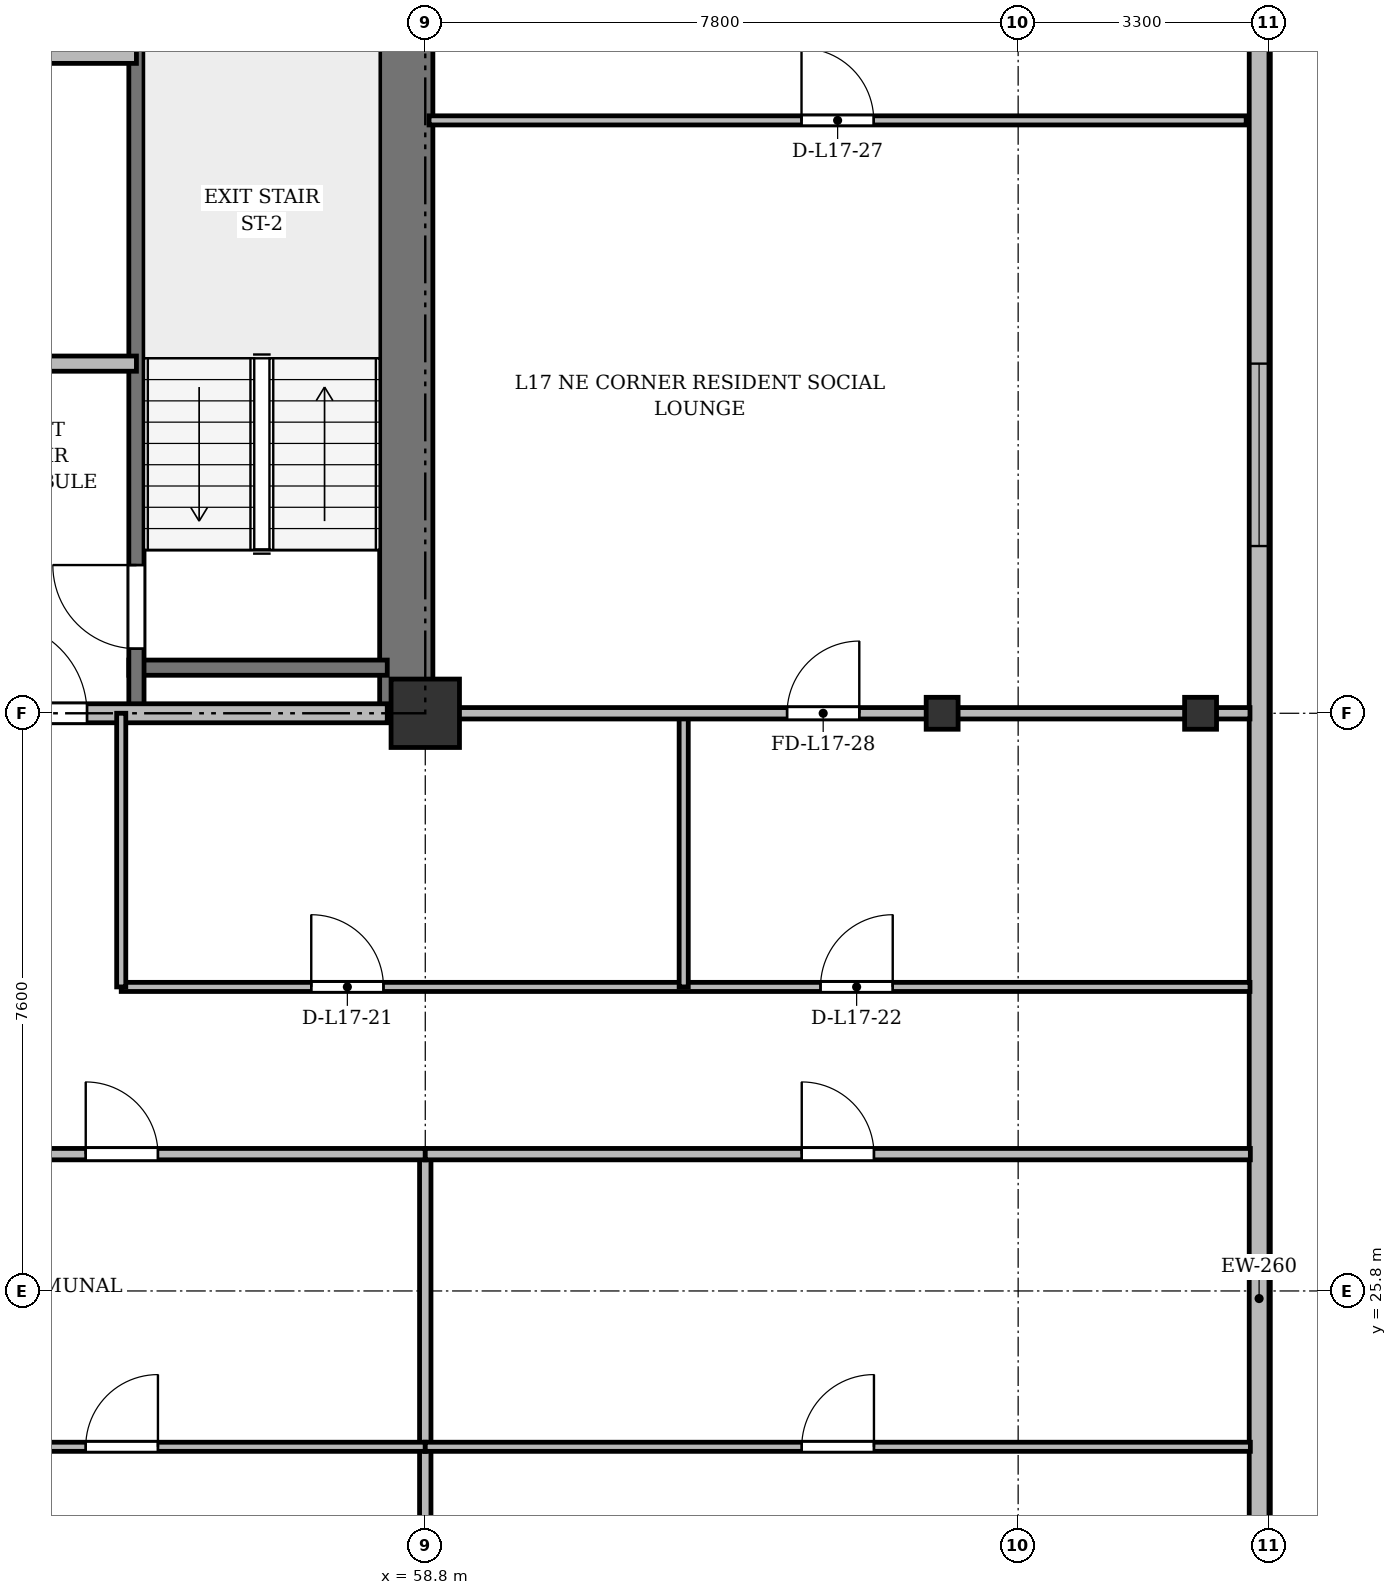
"""IFC4 building model, lengths in metres.
Left out: names, types, materials, properties, quantities, classifications, styles, units other than length and angle.
Written with IfcOpenShell. Run it as: python <this file> out.ifc"""

import sys

from ifc_helpers import new_model, si_unit, direction, frame, frame_2d, origin, origin_2d, place, context, subcontext, project, spatial, rectangle, i_section, extrude, source, transform, mapped, element, fill, save


model = new_model("IFC4")
c1 = context("Model", 3, precision=1e-05, world=origin(), true_north=direction((0.0, 1.0)))
c2 = subcontext(c1, "Body", "Model", "MODEL_VIEW")
j1 = project(units=[si_unit("LENGTHUNIT", "METRE"), si_unit("PLANEANGLEUNIT", "RADIAN")], contexts=[c1])
p1 = place(None, origin())
s1 = spatial("IfcSite", under=j1, at=p1, CompositionType="ELEMENT")
p2 = place(p1, origin())
s2 = spatial("IfcBuilding", under=s1, at=p2, CompositionType="ELEMENT")
p3 = place(p2, frame((0.0, 0.0, 66.7)))
s3 = spatial("IfcBuildingStorey", under=s2, at=p3, CompositionType="ELEMENT", Elevation=66.7)
m1 = source(origin(), c2, "Body", "SweptSolid", [
    extrude(rectangle(XDim=0.9, YDim=0.9, at=origin_2d()), origin(), (0.0, 0.0, 1.0), 3.6),
])
p4 = place(p3, frame((58.8, 33.4, 0.0), z_axis=(0.0, 0.0, 1.0), x_axis=(1.0, 0.0, 0.0)))
e1 = element("IfcColumn", 1, at=p4, inside=s3, PredefinedType="COLUMN", context=c2, shape_type="MappedRepresentation", body=[
    mapped(m1, transform((0.0, 0.0, 0.0), x_axis=(1.0, 0.0, 0.0), y_axis=(0.0, 1.0, 0.0), z_axis=(0.0, 0.0, 1.0), scale=1.0)),
])
m2 = source(origin(), c2, "Body", "SweptSolid", [
    extrude(i_section(OverallWidth=0.42, OverallDepth=0.42, WebThickness=0.026, FlangeThickness=0.04, at=origin_2d()), origin(), (0.0, 0.0, 1.0), 3.6),
])
for number, where, z_axis, x_axis in (
    (2, (65.6, 33.4, 0.0), (0.0, 0.0, 1.0), (1.0, 0.0, 0.0)),
    (3, (69.0, 33.4, 0.0), (0.0, 0.0, 1.0), (1.0, 0.0, 0.0)),
):
    element("IfcColumn", number, at=place(p3, frame(where, z_axis=z_axis, x_axis=x_axis)), inside=s3, PredefinedType="COLUMN", context=c2, shape_type="MappedRepresentation", body=[
        mapped(m2, transform((0.0, 0.0, 0.0), x_axis=(1.0, 0.0, 0.0), y_axis=(0.0, 1.0, 0.0), z_axis=(0.0, 0.0, 1.0), scale=1.0)),
    ])
p5 = place(p3, frame((69.77, 45.5, 0.0), z_axis=(0.0, 0.0, 1.0), x_axis=(0.0, -1.0, 0.0)))
e4 = element("IfcWall", 4, at=p5, inside=s3, PredefinedType="SOLIDWALL", context=c2, shape_type="SweptSolid", body=[
    extrude(rectangle(XDim=39.6, YDim=0.26, at=frame_2d((19.8, 0.0))), origin(), (0.0, 0.0, 1.0), 3.34),
])
p6 = place(p5, frame((36.95, 0.0, 0.92)))
e5 = element("IfcOpeningElement", 5, at=p6, cuts=e4, PredefinedType="OPENING", context=c2, shape_type="SweptSolid", body=[
    extrude(rectangle(XDim=1.2, YDim=1.65, at=frame_2d((0.6, 0.825))), frame((0.0, 0.14, 0.0), z_axis=(0.0, -1.0, 0.0), x_axis=(1.0, 0.0, 0.0)), (0.0, 0.0, 1.0), 0.28),
])
p7 = place(p5, frame((32.9, 0.0, 0.92)))
e6 = element("IfcOpeningElement", 6, at=p7, cuts=e4, PredefinedType="OPENING", context=c2, shape_type="SweptSolid", body=[
    extrude(rectangle(XDim=2.4, YDim=2.1, at=frame_2d((1.2, 1.05))), frame((0.0, 0.14, 0.0), z_axis=(0.0, -1.0, 0.0), x_axis=(1.0, 0.0, 0.0)), (0.0, 0.0, 1.0), 0.28),
])
p8 = place(p5, frame((28.7, 0.0, 0.92)))
e7 = element("IfcOpeningElement", 7, at=p8, cuts=e4, PredefinedType="OPENING", context=c2, shape_type="SweptSolid", body=[
    extrude(rectangle(XDim=2.4, YDim=2.1, at=frame_2d((1.2, 1.05))), frame((0.0, 0.14, 0.0), z_axis=(0.0, -1.0, 0.0), x_axis=(1.0, 0.0, 0.0)), (0.0, 0.0, 1.0), 0.28),
])
p9 = place(p5, frame((7.5, 0.0, 0.92)))
e8 = element("IfcOpeningElement", 8, at=p9, cuts=e4, PredefinedType="OPENING", context=c2, shape_type="SweptSolid", body=[
    extrude(rectangle(XDim=2.4, YDim=2.1, at=frame_2d((1.2, 1.05))), frame((0.0, 0.14, 0.0), z_axis=(0.0, -1.0, 0.0), x_axis=(1.0, 0.0, 0.0)), (0.0, 0.0, 1.0), 0.28),
])
p10 = place(p5, frame((1.15, 0.0, 0.92)))
e9 = element("IfcOpeningElement", 9, at=p10, cuts=e4, PredefinedType="OPENING", context=c2, shape_type="SweptSolid", body=[
    extrude(rectangle(XDim=1.2, YDim=1.65, at=frame_2d((0.6, 0.825))), frame((0.0, 0.14, 0.0), z_axis=(0.0, -1.0, 0.0), x_axis=(1.0, 0.0, 0.0)), (0.0, 0.0, 1.0), 0.28),
])
p11 = place(p3, frame((58.55, 33.4, 0.0), z_axis=(0.0, 0.0, 1.0), x_axis=(0.0, 1.0, 0.0)))
e10 = element("IfcWall", 10, at=p11, inside=s3, PredefinedType="SHEAR", context=c2, shape_type="SweptSolid", body=[
    extrude(rectangle(XDim=11.7, YDim=0.7, at=frame_2d((5.85, 0.0))), origin(), (0.0, 0.0, 1.0), 3.34),
])
p12 = place(p3, frame((54.9, 34.0, 0.0), z_axis=(0.0, 0.0, 1.0), x_axis=(1.0, 0.0, 0.0)))
e11 = element("IfcWall", 11, at=p12, inside=s3, PredefinedType="SHEAR", context=c2, shape_type="SweptSolid", body=[
    extrude(rectangle(XDim=3.4, YDim=0.2, at=frame_2d((1.7, 0.0))), origin(), (0.0, 0.0, 1.0), 3.34),
])
p13 = place(p3, frame((55.0, 33.4, 0.0), z_axis=(0.0, 0.0, 1.0), x_axis=(0.0, 1.0, 0.0)))
e12 = element("IfcWall", 12, at=p13, inside=s3, PredefinedType="SHEAR", context=c2, shape_type="SweptSolid", body=[
    extrude(rectangle(XDim=11.1, YDim=0.2, at=frame_2d((5.55, 0.0))), origin(), (0.0, 0.0, 1.0), 3.34),
])
p14 = place(p13, frame((0.85, 0.0, 0.0)))
e13 = element("IfcOpeningElement", 13, at=p14, cuts=e12, PredefinedType="OPENING", context=c2, shape_type="SweptSolid", body=[
    extrude(rectangle(XDim=1.1, YDim=2.15, at=frame_2d((0.55, 1.075))), frame((0.0, 0.11, 0.0), z_axis=(0.0, -1.0, 0.0), x_axis=(1.0, 0.0, 0.0)), (0.0, 0.0, 1.0), 0.22),
])
p15 = place(p3, frame((47.15, 42.05, 0.0), z_axis=(0.0, 0.0, 1.0), x_axis=(1.0, 0.0, 0.0)))
e14 = element("IfcWall", 14, at=p15, inside=s3, PredefinedType="SOLIDWALL", context=c2, shape_type="SweptSolid", body=[
    extrude(rectangle(XDim=7.85, YDim=0.2, at=frame_2d((3.925, 0.0))), origin(), (0.0, 0.0, 1.0), 2.752),
])
p16 = place(p15, frame((0.75, 0.0, 0.0)))
e15 = element("IfcOpeningElement", 15, at=p16, cuts=e14, PredefinedType="OPENING", context=c2, shape_type="SweptSolid", body=[
    extrude(rectangle(XDim=0.9, YDim=2.1, at=frame_2d((0.45, 1.05))), frame((0.0, 0.11, 0.0), z_axis=(0.0, -1.0, 0.0), x_axis=(1.0, 0.0, 0.0)), (0.0, 0.0, 1.0), 0.22),
])
p17 = place(p15, frame((3.85, 0.0, 0.0)))
e16 = element("IfcOpeningElement", 16, at=p17, cuts=e14, PredefinedType="OPENING", context=c2, shape_type="SweptSolid", body=[
    extrude(rectangle(XDim=0.9, YDim=2.1, at=frame_2d((0.45, 1.05))), frame((0.0, 0.11, 0.0), z_axis=(0.0, -1.0, 0.0), x_axis=(1.0, 0.0, 0.0)), (0.0, 0.0, 1.0), 0.22),
])
p18 = place(p3, frame((52.45, 38.0, 0.0), z_axis=(0.0, 0.0, 1.0), x_axis=(1.0, 0.0, 0.0)))
e17 = element("IfcWall", 17, at=p18, inside=s3, PredefinedType="PARTITIONING", context=c2, shape_type="SweptSolid", body=[
    extrude(rectangle(XDim=2.55, YDim=0.2, at=frame_2d((1.275, 0.0))), origin(), (0.0, 0.0, 1.0), 3.34),
])
p19 = place(p3, frame((47.15, 33.4, 0.0), z_axis=(0.0, 0.0, 1.0), x_axis=(1.0, 0.0, 0.0)))
e18 = element("IfcWall", 18, at=p19, inside=s3, PredefinedType="PARTITIONING", context=c2, shape_type="SweptSolid", body=[
    extrude(rectangle(XDim=11.15, YDim=0.25, at=frame_2d((5.575, 0.0))), origin(), (0.0, 0.0, 1.0), 2.69),
])
p20 = place(p19, frame((0.7, 0.0, 0.0)))
e19 = element("IfcOpeningElement", 19, at=p20, cuts=e18, PredefinedType="OPENING", context=c2, shape_type="SweptSolid", body=[
    extrude(rectangle(XDim=0.95, YDim=2.15, at=frame_2d((0.475, 1.075))), frame((0.0, 0.135, 0.0), z_axis=(0.0, -1.0, 0.0), x_axis=(1.0, 0.0, 0.0)), (0.0, 0.0, 1.0), 0.27),
])
p21 = place(p19, frame((6.0, 0.0, 0.0)))
e20 = element("IfcOpeningElement", 20, at=p21, cuts=e18, PredefinedType="OPENING", context=c2, shape_type="SweptSolid", body=[
    extrude(rectangle(XDim=1.2, YDim=2.15, at=frame_2d((0.6, 1.075))), frame((0.0, 0.135, 0.0), z_axis=(0.0, -1.0, 0.0), x_axis=(1.0, 0.0, 0.0)), (0.0, 0.0, 1.0), 0.27),
])
p22 = place(p3, frame((54.8, 29.8, 0.0), z_axis=(0.0, 0.0, 1.0), x_axis=(1.0, 0.0, 0.0)))
e21 = element("IfcWall", 21, at=p22, inside=s3, PredefinedType="PARTITIONING", context=c2, shape_type="SweptSolid", body=[
    extrude(rectangle(XDim=14.85, YDim=0.12, at=frame_2d((7.425, 0.0))), origin(), (0.0, 0.0, 1.0), 2.752),
])
p23 = place(p22, frame((2.5, 0.0, 0.0)))
e22 = element("IfcOpeningElement", 22, at=p23, cuts=e21, PredefinedType="OPENING", context=c2, shape_type="SweptSolid", body=[
    extrude(rectangle(XDim=0.95, YDim=2.15, at=frame_2d((0.475, 1.075))), frame((0.0, 0.07, 0.0), z_axis=(0.0, -1.0, 0.0), x_axis=(1.0, 0.0, 0.0)), (0.0, 0.0, 1.0), 0.14),
])
p24 = place(p22, frame((9.2, 0.0, 0.0)))
e23 = element("IfcOpeningElement", 23, at=p24, cuts=e21, PredefinedType="OPENING", context=c2, shape_type="SweptSolid", body=[
    extrude(rectangle(XDim=0.95, YDim=2.15, at=frame_2d((0.475, 1.075))), frame((0.0, 0.07, 0.0), z_axis=(0.0, -1.0, 0.0), x_axis=(1.0, 0.0, 0.0)), (0.0, 0.0, 1.0), 0.14),
])
for number, where, z_axis, x_axis in (
    (24, (62.2, 29.8, 0.0), (0.0, 0.0, 1.0), (0.0, 1.0, 0.0)),
    (25, (54.8, 29.8, 0.0), (0.0, 0.0, 1.0), (0.0, 1.0, 0.0)),
):
    element("IfcWall", number, at=place(p3, frame(where, z_axis=z_axis, x_axis=x_axis)), inside=s3, PredefinedType="PARTITIONING", context=c2, shape_type="SweptSolid", body=[
        extrude(rectangle(XDim=3.6, YDim=0.12, at=frame_2d((1.8, 0.0))), origin(), (0.0, 0.0, 1.0), 2.69),
    ])
p25 = place(p3, frame((58.85, 41.2, 0.0), z_axis=(0.0, 0.0, 1.0), x_axis=(1.0, 0.0, 0.0)))
e26 = element("IfcWall", 26, at=p25, inside=s3, PredefinedType="PARTITIONING", context=c2, shape_type="SweptSolid", body=[
    extrude(rectangle(XDim=10.75, YDim=0.12, at=frame_2d((5.375, 0.0))), origin(), (0.0, 0.0, 1.0), 2.752),
])
p26 = place(p25, frame((4.9, 0.0, 0.0)))
e27 = element("IfcOpeningElement", 27, at=p26, cuts=e26, PredefinedType="OPENING", context=c2, shape_type="SweptSolid", body=[
    extrude(rectangle(XDim=0.95, YDim=2.15, at=frame_2d((0.475, 1.075))), frame((0.0, 0.07, 0.0), z_axis=(0.0, -1.0, 0.0), x_axis=(1.0, 0.0, 0.0)), (0.0, 0.0, 1.0), 0.14),
])
p27 = place(p3, frame((58.8, 33.4, 0.0), z_axis=(0.0, 0.0, 1.0), x_axis=(1.0, 0.0, 0.0)))
e28 = element("IfcWall", 28, at=p27, inside=s3, PredefinedType="PARTITIONING", context=c2, shape_type="SweptSolid", body=[
    extrude(rectangle(XDim=10.85, YDim=0.15, at=frame_2d((5.425, 0.0))), origin(), (0.0, 0.0, 1.0), 2.69),
])
p28 = place(p27, frame((4.76, 0.0, 0.0)))
e29 = element("IfcOpeningElement", 29, at=p28, cuts=e28, PredefinedType="OPENING", context=c2, shape_type="SweptSolid", body=[
    extrude(rectangle(XDim=0.95, YDim=2.15, at=frame_2d((0.475, 1.075))), frame((0.0, 0.085, 0.0), z_axis=(0.0, -1.0, 0.0), x_axis=(1.0, 0.0, 0.0)), (0.0, 0.0, 1.0), 0.17),
])
p29 = place(p3, frame((58.8, 3.145, 0.0), z_axis=(0.0, 0.0, 1.0), x_axis=(0.0, 1.0, 0.0)))
e30 = element("IfcWall", 30, at=p29, inside=s3, PredefinedType="PARTITIONING", context=c2, shape_type="SweptSolid", body=[
    extrude(rectangle(XDim=24.455, YDim=0.15, at=frame_2d((12.228, 0.0))), origin(), (0.0, 0.0, 1.0), 2.752),
])
p30 = place(p3, frame((51.0, 27.6, 0.0), z_axis=(0.0, 0.0, 1.0), x_axis=(1.0, 0.0, 0.0)))
e31 = element("IfcWall", 31, at=p30, inside=s3, PredefinedType="PARTITIONING", context=c2, shape_type="SweptSolid", body=[
    extrude(rectangle(XDim=7.8, YDim=0.15, at=frame_2d((3.9, 0.0))), origin(), (0.0, 0.0, 1.0), 2.752),
])
p31 = place(p30, frame((3.333, 0.0, 0.0)))
e32 = element("IfcOpeningElement", 32, at=p31, cuts=e31, PredefinedType="OPENING", context=c2, shape_type="SweptSolid", body=[
    extrude(rectangle(XDim=0.95, YDim=2.15, at=frame_2d((0.475, 1.075))), frame((0.0, 0.085, 0.0), z_axis=(0.0, -1.0, 0.0), x_axis=(1.0, 0.0, 0.0)), (0.0, 0.0, 1.0), 0.17),
])
p32 = place(p3, frame((51.0, 23.75, 0.0), z_axis=(0.0, 0.0, 1.0), x_axis=(1.0, 0.0, 0.0)))
e33 = element("IfcWall", 33, at=p32, inside=s3, PredefinedType="PARTITIONING", context=c2, shape_type="SweptSolid", body=[
    extrude(rectangle(XDim=7.8, YDim=0.12, at=frame_2d((3.9, 0.0))), origin(), (0.0, 0.0, 1.0), 2.752),
])
p33 = place(p32, frame((3.333, 0.0, 0.0)))
e34 = element("IfcOpeningElement", 34, at=p33, cuts=e33, PredefinedType="OPENING", context=c2, shape_type="SweptSolid", body=[
    extrude(rectangle(XDim=0.95, YDim=2.15, at=frame_2d((0.475, 1.075))), frame((0.0, 0.07, 0.0), z_axis=(0.0, -1.0, 0.0), x_axis=(1.0, 0.0, 0.0)), (0.0, 0.0, 1.0), 0.14),
])
p34 = place(p3, frame((58.8, 27.6, 0.0), z_axis=(0.0, 0.0, 1.0), x_axis=(1.0, 0.0, 0.0)))
e35 = element("IfcWall", 35, at=p34, inside=s3, PredefinedType="PARTITIONING", context=c2, shape_type="SweptSolid", body=[
    extrude(rectangle(XDim=10.855, YDim=0.15, at=frame_2d((5.427, 0.0))), origin(), (0.0, 0.0, 1.0), 2.752),
])
p35 = place(p34, frame((4.953, 0.0, 0.0)))
e36 = element("IfcOpeningElement", 36, at=p35, cuts=e35, PredefinedType="OPENING", context=c2, shape_type="SweptSolid", body=[
    extrude(rectangle(XDim=0.95, YDim=2.15, at=frame_2d((0.475, 1.075))), frame((0.0, 0.085, 0.0), z_axis=(0.0, -1.0, 0.0), x_axis=(1.0, 0.0, 0.0)), (0.0, 0.0, 1.0), 0.17),
])
p36 = place(p3, frame((58.8, 23.75, 0.0), z_axis=(0.0, 0.0, 1.0), x_axis=(1.0, 0.0, 0.0)))
e37 = element("IfcWall", 37, at=p36, inside=s3, PredefinedType="PARTITIONING", context=c2, shape_type="SweptSolid", body=[
    extrude(rectangle(XDim=10.855, YDim=0.12, at=frame_2d((5.427, 0.0))), origin(), (0.0, 0.0, 1.0), 2.752),
])
p37 = place(p36, frame((4.953, 0.0, 0.0)))
e38 = element("IfcOpeningElement", 38, at=p37, cuts=e37, PredefinedType="OPENING", context=c2, shape_type="SweptSolid", body=[
    extrude(rectangle(XDim=0.95, YDim=2.15, at=frame_2d((0.475, 1.075))), frame((0.0, 0.07, 0.0), z_axis=(0.0, -1.0, 0.0), x_axis=(1.0, 0.0, 0.0)), (0.0, 0.0, 1.0), 0.14),
])
m3 = source(origin(), c2, "Body", "SweptSolid", [
    extrude(rectangle(XDim=2.4, YDim=2.1, at=frame_2d((1.2, 1.05))), frame((0.0, 0.03, 0.0), z_axis=(0.0, -1.0, 0.0), x_axis=(1.0, 0.0, 0.0)), (0.0, 0.0, 1.0), 0.06),
])
p38 = place(p9, origin())
e39 = element("IfcWindow", 39, at=p38, inside=s3, PartitioningType="SINGLE_PANEL", PredefinedType="WINDOW", context=c2, shape_type="MappedRepresentation", body=[
    mapped(m3, transform((0.0, 0.0, 0.0), x_axis=(1.0, 0.0, 0.0), y_axis=(0.0, 1.0, 0.0), z_axis=(0.0, 0.0, 1.0), scale=1.0)),
])
fill(e8, e39)
m4 = source(origin(), c2, "Body", "SweptSolid", [
    extrude(rectangle(XDim=1.1, YDim=2.15, at=frame_2d((0.55, 1.075))), frame((0.0, 0.025, 0.0), z_axis=(0.0, -1.0, 0.0), x_axis=(1.0, 0.0, 0.0)), (0.0, 0.0, 1.0), 0.05),
])
p39 = place(p14, origin())
e40 = element("IfcDoor", 40, at=p39, inside=s3, OperationType="SINGLE_SWING_RIGHT", PredefinedType="DOOR", context=c2, shape_type="MappedRepresentation", body=[
    mapped(m4, transform((0.0, 0.0, 0.0), x_axis=(1.0, 0.0, 0.0), y_axis=(0.0, 1.0, 0.0), z_axis=(0.0, 0.0, 1.0), scale=1.0)),
])
fill(e13, e40)
m5 = source(origin(), c2, "Body", "SweptSolid", [
    extrude(rectangle(XDim=1.2, YDim=2.15, at=frame_2d((0.6, 1.075))), frame((0.0, 0.025, 0.0), z_axis=(0.0, -1.0, 0.0), x_axis=(1.0, 0.0, 0.0)), (0.0, 0.0, 1.0), 0.05),
])
p40 = place(p21, origin())
e41 = element("IfcDoor", 41, at=p40, inside=s3, OperationType="SINGLE_SWING_LEFT", PredefinedType="DOOR", context=c2, shape_type="MappedRepresentation", body=[
    mapped(m5, transform((0.0, 0.0, 0.0), x_axis=(1.0, 0.0, 0.0), y_axis=(0.0, 1.0, 0.0), z_axis=(0.0, 0.0, 1.0), scale=1.0)),
])
fill(e20, e41)
m6 = source(origin(), c2, "Body", "SweptSolid", [
    extrude(rectangle(XDim=0.95, YDim=2.15, at=frame_2d((0.475, 1.075))), frame((0.0, 0.025, 0.0), z_axis=(0.0, -1.0, 0.0), x_axis=(1.0, 0.0, 0.0)), (0.0, 0.0, 1.0), 0.05),
])
p41 = place(p23, origin())
e42 = element("IfcDoor", 42, at=p41, inside=s3, OperationType="SINGLE_SWING_LEFT", PredefinedType="DOOR", context=c2, shape_type="MappedRepresentation", body=[
    mapped(m6, transform((0.0, 0.0, 0.0), x_axis=(1.0, 0.0, 0.0), y_axis=(0.0, 1.0, 0.0), z_axis=(0.0, 0.0, 1.0), scale=1.0)),
])
fill(e22, e42)
p42 = place(p24, origin())
e43 = element("IfcDoor", 43, at=p42, inside=s3, OperationType="SINGLE_SWING_RIGHT", PredefinedType="DOOR", context=c2, shape_type="MappedRepresentation", body=[
    mapped(m6, transform((0.0, 0.0, 0.0), x_axis=(1.0, 0.0, 0.0), y_axis=(0.0, 1.0, 0.0), z_axis=(0.0, 0.0, 1.0), scale=1.0)),
])
fill(e23, e43)
p43 = place(p26, origin())
e44 = element("IfcDoor", 44, at=p43, inside=s3, OperationType="SINGLE_SWING_LEFT", PredefinedType="DOOR", context=c2, shape_type="MappedRepresentation", body=[
    mapped(m6, transform((0.0, 0.0, 0.0), x_axis=(1.0, 0.0, 0.0), y_axis=(0.0, 1.0, 0.0), z_axis=(0.0, 0.0, 1.0), scale=1.0)),
])
fill(e27, e44)
p44 = place(p28, origin())
e45 = element("IfcDoor", 45, at=p44, inside=s3, OperationType="SINGLE_SWING_RIGHT", PredefinedType="DOOR", context=c2, shape_type="MappedRepresentation", body=[
    mapped(m6, transform((0.0, 0.0, 0.0), x_axis=(1.0, 0.0, 0.0), y_axis=(0.0, 1.0, 0.0), z_axis=(0.0, 0.0, 1.0), scale=1.0)),
])
fill(e29, e45)
p45 = place(p31, origin())
e46 = element("IfcDoor", 46, at=p45, inside=s3, OperationType="SINGLE_SWING_LEFT", PredefinedType="DOOR", context=c2, shape_type="MappedRepresentation", body=[
    mapped(m6, transform((0.0, 0.0, 0.0), x_axis=(1.0, 0.0, 0.0), y_axis=(0.0, 1.0, 0.0), z_axis=(0.0, 0.0, 1.0), scale=1.0)),
])
fill(e32, e46)
p46 = place(p33, origin())
e47 = element("IfcDoor", 47, at=p46, inside=s3, OperationType="SINGLE_SWING_RIGHT", PredefinedType="DOOR", context=c2, shape_type="MappedRepresentation", body=[
    mapped(m6, transform((0.0, 0.0, 0.0), x_axis=(1.0, 0.0, 0.0), y_axis=(0.0, 1.0, 0.0), z_axis=(0.0, 0.0, 1.0), scale=1.0)),
])
fill(e34, e47)
p47 = place(p35, origin())
e48 = element("IfcDoor", 48, at=p47, inside=s3, OperationType="SINGLE_SWING_LEFT", PredefinedType="DOOR", context=c2, shape_type="MappedRepresentation", body=[
    mapped(m6, transform((0.0, 0.0, 0.0), x_axis=(1.0, 0.0, 0.0), y_axis=(0.0, 1.0, 0.0), z_axis=(0.0, 0.0, 1.0), scale=1.0)),
])
fill(e36, e48)
p48 = place(p37, origin())
e49 = element("IfcDoor", 49, at=p48, inside=s3, OperationType="SINGLE_SWING_RIGHT", PredefinedType="DOOR", context=c2, shape_type="MappedRepresentation", body=[
    mapped(m6, transform((0.0, 0.0, 0.0), x_axis=(1.0, 0.0, 0.0), y_axis=(0.0, 1.0, 0.0), z_axis=(0.0, 0.0, 1.0), scale=1.0)),
])
fill(e38, e49)
save(model, sys.argv[1])
